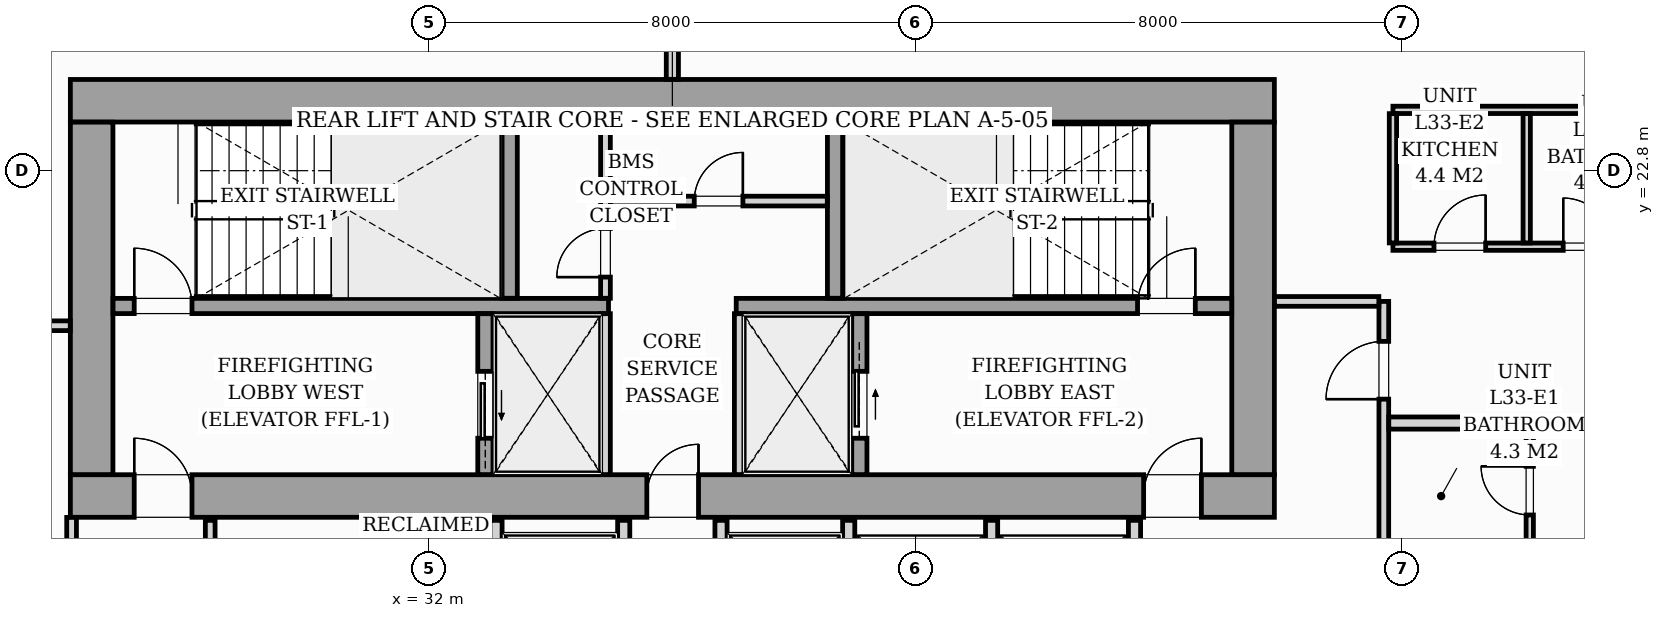
"""IFC4 building model, lengths in metres.
Left out: names, types, materials, properties, quantities, classifications, styles, units other than length and angle.
Written with IfcOpenShell. Run it as: python <this file> out.ifc"""

import sys

from ifc_helpers import new_model, si_unit, direction, frame, frame_2d, origin, origin_2d, place, context, subcontext, project, spatial, rectangle, i_section, extrude, source, transform, mapped, element, fill, save


model = new_model("IFC4")
c1 = context("Model", 3, precision=1e-05, world=origin(), true_north=direction((0.0, 1.0)))
c2 = subcontext(c1, "Body", "Model", "MODEL_VIEW")
j1 = project(units=[si_unit("LENGTHUNIT", "METRE"), si_unit("PLANEANGLEUNIT", "RADIAN")], contexts=[c1])
p1 = place(None, origin())
s1 = spatial("IfcSite", under=j1, at=p1, CompositionType="ELEMENT")
p2 = place(p1, origin())
s2 = spatial("IfcBuilding", under=s1, at=p2, CompositionType="ELEMENT")
p3 = place(p2, frame((0.0, 0.0, 116.2)))
s3 = spatial("IfcBuildingStorey", under=s2, at=p3, CompositionType="ELEMENT", Elevation=116.2)
m1 = source(origin(), c2, "Body", "SweptSolid", [
    extrude(i_section(OverallWidth=0.427, OverallDepth=0.483, WebThickness=0.051, FlangeThickness=0.082, FilletRadius=0.018, at=origin_2d()), origin(), (0.0, 0.0, 1.0), 3.196),
])
for number, where, z_axis, x_axis in (
    (1, (26.4, 17.4, 0.002), (0.0, 0.0, 1.0), (1.0, 0.0, 0.0)),
    (2, (33.12, 17.4, 0.002), (0.0, 0.0, 1.0), (1.0, 0.0, 0.0)),
    (3, (38.88, 17.4, 0.002), (0.0, 0.0, 1.0), (1.0, 0.0, 0.0)),
    (4, (45.6, 17.4, 0.002), (0.0, 0.0, 1.0), (1.0, 0.0, 0.0)),
    (5, (26.4, 24.0, 0.002), (0.0, 0.0, 1.0), (1.0, 0.0, 0.0)),
    (6, (33.12, 24.0, 0.002), (0.0, 0.0, 1.0), (1.0, 0.0, 0.0)),
    (7, (38.88, 24.0, 0.002), (0.0, 0.0, 1.0), (1.0, 0.0, 0.0)),
    (8, (45.6, 24.0, 0.002), (0.0, 0.0, 1.0), (1.0, 0.0, 0.0)),
):
    element("IfcColumn", number, at=place(p3, frame(where, z_axis=z_axis, x_axis=x_axis)), inside=s3, PredefinedType="PILASTER", context=c2, shape_type="MappedRepresentation", body=[
        mapped(m1, transform((0.0, 0.0, 0.0), scale=1.0)),
    ])
p4 = place(p3, frame((11.08, 23.508, 0.0), z_axis=(0.0, 0.0, 1.0), x_axis=(0.995396638587, 0.095841180552, 0.0)))
e9 = element("IfcWall", 9, at=p4, inside=s3, PredefinedType="STANDARD", context=c2, shape_type="SweptSolid", body=[
    extrude(rectangle(XDim=19.11, YDim=0.26, at=frame_2d((9.555, 0.0))), origin(), (0.0, 0.0, 1.0), 2.9),
])
p5 = place(p4, frame((10.754, 0.0, 0.0)))
e10 = element("IfcOpeningElement", 10, at=p5, cuts=e9, PredefinedType="OPENING", context=c2, shape_type="SweptSolid", body=[
    extrude(rectangle(XDim=1.8, YDim=2.06, at=frame_2d((0.9, 1.03))), frame((0.0, 0.14, 0.0), z_axis=(0.0, -1.0, 0.0), x_axis=(1.0, 0.0, 0.0)), (0.0, 0.0, 1.0), 0.28),
])
p6 = place(p4, frame((2.05, 0.0, 0.65)))
e11 = element("IfcOpeningElement", 11, at=p6, cuts=e9, PredefinedType="OPENING", context=c2, shape_type="SweptSolid", body=[
    extrude(rectangle(XDim=1.6, YDim=1.5, at=frame_2d((0.8, 0.75))), frame((0.0, 0.14, 0.0), z_axis=(0.0, -1.0, 0.0), x_axis=(1.0, 0.0, 0.0)), (0.0, 0.0, 1.0), 0.28),
])
p7 = place(p3, frame((26.1, 17.45, 0.0), z_axis=(0.0, 0.0, 1.0), x_axis=(1.0, 0.0, 0.0)))
e12 = element("IfcWall", 12, at=p7, inside=s3, PredefinedType="SHEAR", context=c2, shape_type="SweptSolid", body=[
    extrude(rectangle(XDim=19.8, YDim=0.7, at=frame_2d((9.9, 0.0))), origin(), (0.0, 0.0, 1.0), 3.2),
])
p8 = place(p7, frame((1.05, 0.0, 0.0)))
e13 = element("IfcOpeningElement", 13, at=p8, cuts=e12, PredefinedType="OPENING", context=c2, shape_type="SweptSolid", body=[
    extrude(rectangle(XDim=0.95, YDim=2.06, at=frame_2d((0.475, 1.03))), frame((0.0, 0.36, 0.0), z_axis=(0.0, -1.0, 0.0), x_axis=(1.0, 0.0, 0.0)), (0.0, 0.0, 1.0), 0.72),
])
p9 = place(p7, frame((9.48, 0.0, 0.0)))
e14 = element("IfcOpeningElement", 14, at=p9, cuts=e12, PredefinedType="OPENING", context=c2, shape_type="SweptSolid", body=[
    extrude(rectangle(XDim=0.85, YDim=2.0, at=frame_2d((0.425, 1.0))), frame((0.0, 0.36, 0.0), z_axis=(0.0, -1.0, 0.0), x_axis=(1.0, 0.0, 0.0)), (0.0, 0.0, 1.0), 0.72),
])
p10 = place(p7, frame((17.65, 0.0, 0.0)))
e15 = element("IfcOpeningElement", 15, at=p10, cuts=e12, PredefinedType="OPENING", context=c2, shape_type="SweptSolid", body=[
    extrude(rectangle(XDim=0.95, YDim=2.06, at=frame_2d((0.475, 1.03))), frame((0.0, 0.36, 0.0), z_axis=(0.0, -1.0, 0.0), x_axis=(1.0, 0.0, 0.0)), (0.0, 0.0, 1.0), 0.72),
])
p11 = place(p3, frame((26.1, 23.95, 0.0), z_axis=(0.0, 0.0, 1.0), x_axis=(1.0, 0.0, 0.0)))
e16 = element("IfcWall", 16, at=p11, inside=s3, PredefinedType="SHEAR", context=c2, shape_type="SweptSolid", body=[
    extrude(rectangle(XDim=19.8, YDim=0.7, at=frame_2d((9.9, 0.0))), origin(), (0.0, 0.0, 1.0), 3.2),
])
for number, where, z_axis, x_axis in (
    (17, (26.45, 17.802, 0.0), (0.0, 0.0, 1.0), (0.0, 1.0, 0.0)),
    (18, (45.55, 17.802, 0.0), (0.0, 0.0, 1.0), (0.0, 1.0, 0.0)),
):
    element("IfcWall", number, at=place(p3, frame(where, z_axis=z_axis, x_axis=x_axis)), inside=s3, PredefinedType="SHEAR", context=c2, shape_type="SweptSolid", body=[
        extrude(rectangle(XDim=5.796, YDim=0.7, at=frame_2d((2.898, 0.0))), origin(), (0.0, 0.0, 1.0), 3.2),
    ])
p12 = place(p3, frame((26.802, 20.575, 0.0), z_axis=(0.0, 0.0, 1.0), x_axis=(1.0, 0.0, 0.0)))
e19 = element("IfcWall", 19, at=p12, inside=s3, PredefinedType="SOLIDWALL", context=c2, shape_type="SweptSolid", body=[
    extrude(rectangle(XDim=8.148, YDim=0.25, at=frame_2d((4.074, 0.0))), origin(), (0.0, 0.0, 1.0), 3.2),
])
p13 = place(p12, frame((0.348, 0.0, 0.0)))
e20 = element("IfcOpeningElement", 20, at=p13, cuts=e19, PredefinedType="OPENING", context=c2, shape_type="SweptSolid", body=[
    extrude(rectangle(XDim=0.95, YDim=2.06, at=frame_2d((0.475, 1.03))), frame((0.0, 0.135, 0.0), z_axis=(0.0, -1.0, 0.0), x_axis=(1.0, 0.0, 0.0)), (0.0, 0.0, 1.0), 0.27),
])
p14 = place(p3, frame((37.05, 20.575, 0.0), z_axis=(0.0, 0.0, 1.0), x_axis=(1.0, 0.0, 0.0)))
e21 = element("IfcWall", 21, at=p14, inside=s3, PredefinedType="SOLIDWALL", context=c2, shape_type="SweptSolid", body=[
    extrude(rectangle(XDim=8.148, YDim=0.25, at=frame_2d((4.074, 0.0))), origin(), (0.0, 0.0, 1.0), 3.2),
])
p15 = place(p14, frame((6.6, 0.0, 0.0)))
e22 = element("IfcOpeningElement", 22, at=p15, cuts=e21, PredefinedType="OPENING", context=c2, shape_type="SweptSolid", body=[
    extrude(rectangle(XDim=0.95, YDim=2.06, at=frame_2d((0.475, 1.03))), frame((0.0, 0.135, 0.0), z_axis=(0.0, -1.0, 0.0), x_axis=(1.0, 0.0, 0.0)), (0.0, 0.0, 1.0), 0.27),
])
for number, where, z_axis, x_axis in (
    (23, (33.325, 20.702, 0.0), (0.0, 0.0, 1.0), (0.0, 1.0, 0.0)),
    (24, (38.675, 20.702, 0.0), (0.0, 0.0, 1.0), (0.0, 1.0, 0.0)),
):
    element("IfcWall", number, at=place(p3, frame(where, z_axis=z_axis, x_axis=x_axis)), inside=s3, PredefinedType="SOLIDWALL", context=c2, shape_type="SweptSolid", body=[
        extrude(rectangle(XDim=2.896, YDim=0.25, at=frame_2d((1.448, 0.0))), origin(), (0.0, 0.0, 1.0), 3.2),
    ])
p16 = place(p3, frame((32.925, 17.802, 0.0), z_axis=(0.0, 0.0, 1.0), x_axis=(0.0, 1.0, 0.0)))
e25 = element("IfcWall", 25, at=p16, inside=s3, PredefinedType="SOLIDWALL", context=c2, shape_type="SweptSolid", body=[
    extrude(rectangle(XDim=2.646, YDim=0.25, at=frame_2d((1.323, 0.0))), origin(), (0.0, 0.0, 1.0), 3.2),
])
p17 = place(p16, frame((0.598, 0.0, 0.0)))
e26 = element("IfcOpeningElement", 26, at=p17, cuts=e25, PredefinedType="OPENING", context=c2, shape_type="SweptSolid", body=[
    extrude(rectangle(XDim=1.1, YDim=2.08, at=frame_2d((0.55, 1.04))), frame((0.0, 0.135, 0.0), z_axis=(0.0, -1.0, 0.0), x_axis=(1.0, 0.0, 0.0)), (0.0, 0.0, 1.0), 0.27),
])
for number, where, z_axis, x_axis in (
    (27, (34.9, 17.802, 0.0), (0.0, 0.0, 1.0), (0.0, 1.0, 0.0)),
    (28, (37.1, 17.802, 0.0), (0.0, 0.0, 1.0), (0.0, 1.0, 0.0)),
):
    element("IfcWall", number, at=place(p3, frame(where, z_axis=z_axis, x_axis=x_axis)), inside=s3, PredefinedType="PARTITIONING", context=c2, shape_type="SweptSolid", body=[
        extrude(rectangle(XDim=2.646, YDim=0.16, at=frame_2d((1.323, 0.0))), origin(), (0.0, 0.0, 1.0), 2.9),
    ])
p18 = place(p3, frame((39.075, 17.802, 0.0), z_axis=(0.0, 0.0, 1.0), x_axis=(0.0, 1.0, 0.0)))
e29 = element("IfcWall", 29, at=p18, inside=s3, PredefinedType="SOLIDWALL", context=c2, shape_type="SweptSolid", body=[
    extrude(rectangle(XDim=2.646, YDim=0.25, at=frame_2d((1.323, 0.0))), origin(), (0.0, 0.0, 1.0), 3.2),
])
p19 = place(p18, frame((0.598, 0.0, 0.0)))
e30 = element("IfcOpeningElement", 30, at=p19, cuts=e29, PredefinedType="OPENING", context=c2, shape_type="SweptSolid", body=[
    extrude(rectangle(XDim=1.1, YDim=2.08, at=frame_2d((0.55, 1.04))), frame((0.0, 0.135, 0.0), z_axis=(0.0, -1.0, 0.0), x_axis=(1.0, 0.0, 0.0)), (0.0, 0.0, 1.0), 0.27),
])
p20 = place(p3, frame((34.9, 20.702, 0.0), z_axis=(0.0, 0.0, 1.0), x_axis=(0.0, 1.0, 0.0)))
e31 = element("IfcWall", 31, at=p20, inside=s3, PredefinedType="PARTITIONING", context=c2, shape_type="SweptSolid", body=[
    extrude(rectangle(XDim=2.896, YDim=0.16, at=frame_2d((1.448, 0.0))), origin(), (0.0, 0.0, 1.0), 2.9),
])
p21 = place(p20, frame((0.348, 0.0, 0.0)))
e32 = element("IfcOpeningElement", 32, at=p21, cuts=e31, PredefinedType="OPENING", context=c2, shape_type="SweptSolid", body=[
    extrude(rectangle(XDim=0.8, YDim=2.05, at=frame_2d((0.4, 1.025))), frame((0.0, 0.09, 0.0), z_axis=(0.0, -1.0, 0.0), x_axis=(1.0, 0.0, 0.0)), (0.0, 0.0, 1.0), 0.18),
])
p22 = place(p3, frame((34.982, 22.3, 0.0), z_axis=(0.0, 0.0, 1.0), x_axis=(1.0, 0.0, 0.0)))
e33 = element("IfcWall", 33, at=p22, inside=s3, PredefinedType="PARTITIONING", context=c2, shape_type="SweptSolid", body=[
    extrude(rectangle(XDim=3.566, YDim=0.16, at=frame_2d((1.783, 0.0))), origin(), (0.0, 0.0, 1.0), 2.9),
])
p23 = place(p22, frame((1.378, 0.0, 0.0)))
e34 = element("IfcOpeningElement", 34, at=p23, cuts=e33, PredefinedType="OPENING", context=c2, shape_type="SweptSolid", body=[
    extrude(rectangle(XDim=0.8, YDim=2.05, at=frame_2d((0.4, 1.025))), frame((0.0, 0.09, 0.0), z_axis=(0.0, -1.0, 0.0), x_axis=(1.0, 0.0, 0.0)), (0.0, 0.0, 1.0), 0.18),
])
p24 = place(p3, frame((28.4, 14.75, 0.0), z_axis=(0.0, 0.0, 1.0), x_axis=(0.0, 1.0, 0.0)))
e35 = element("IfcWall", 35, at=p24, inside=s3, PredefinedType="PARTITIONING", context=c2, shape_type="SweptSolid", body=[
    extrude(rectangle(XDim=2.3, YDim=0.16, at=frame_2d((1.15, 0.0))), origin(), (0.0, 0.0, 1.0), 2.9),
])
for number, where, z_axis, x_axis in (
    (36, (33.1, 14.75, 0.0), (0.0, 0.0, 1.0), (0.0, 1.0, 0.0)),
    (37, (35.2, 14.75, 0.0), (0.0, 0.0, 1.0), (0.0, 1.0, 0.0)),
    (38, (36.8, 14.75, 0.0), (0.0, 0.0, 1.0), (0.0, 1.0, 0.0)),
    (39, (38.9, 14.75, 0.0), (0.0, 0.0, 1.0), (0.0, 1.0, 0.0)),
    (40, (41.25, 14.75, 0.0), (0.0, 0.0, 1.0), (0.0, 1.0, 0.0)),
    (41, (43.6, 14.75, 0.0), (0.0, 0.0, 1.0), (0.0, 1.0, 0.0)),
):
    element("IfcWall", number, at=place(p3, frame(where, z_axis=z_axis, x_axis=x_axis)), inside=s3, PredefinedType="PARTITIONING", context=c2, shape_type="SweptSolid", body=[
        extrude(rectangle(XDim=2.3, YDim=0.2, at=frame_2d((1.15, 0.0))), origin(), (0.0, 0.0, 1.0), 2.9),
    ])
p25 = place(p3, frame((47.7, 12.732, 0.0), z_axis=(0.0, 0.0, 1.0), x_axis=(0.0, 1.0, 0.0)))
e42 = element("IfcWall", 42, at=p25, inside=s3, PredefinedType="PARTITIONING", context=c2, shape_type="SweptSolid", body=[
    extrude(rectangle(XDim=7.918, YDim=0.16, at=frame_2d((3.959, 0.0))), origin(), (0.0, 0.0, 1.0), 2.9),
])
p26 = place(p25, frame((0.493, 0.0, 0.0)))
e43 = element("IfcOpeningElement", 43, at=p26, cuts=e42, PredefinedType="OPENING", context=c2, shape_type="SweptSolid", body=[
    extrude(rectangle(XDim=0.85, YDim=2.0, at=frame_2d((0.425, 1.0))), frame((0.0, 0.09, 0.0), z_axis=(0.0, -1.0, 0.0), x_axis=(1.0, 0.0, 0.0)), (0.0, 0.0, 1.0), 0.18),
])
p27 = place(p25, frame((6.311, 0.0, 0.0)))
e44 = element("IfcOpeningElement", 44, at=p27, cuts=e42, PredefinedType="OPENING", context=c2, shape_type="SweptSolid", body=[
    extrude(rectangle(XDim=0.95, YDim=2.06, at=frame_2d((0.475, 1.03))), frame((0.0, 0.09, 0.0), z_axis=(0.0, -1.0, 0.0), x_axis=(1.0, 0.0, 0.0)), (0.0, 0.0, 1.0), 0.18),
])
p28 = place(p3, frame((36.0, 24.302, 0.0), z_axis=(0.0, 0.0, 1.0), x_axis=(0.0, 1.0, 0.0)))
e45 = element("IfcWall", 45, at=p28, inside=s3, PredefinedType="PARTITIONING", context=c2, shape_type="SweptSolid", body=[
    extrude(rectangle(XDim=1.656, YDim=0.2, at=frame_2d((0.828, 0.0))), origin(), (0.0, 0.0, 1.0), 2.9),
])
p29 = place(p3, frame((45.902, 20.65, 0.0), z_axis=(0.0, 0.0, 1.0), x_axis=(1.0, 0.0, 0.0)))
e46 = element("IfcWall", 46, at=p29, inside=s3, PredefinedType="PARTITIONING", context=c2, shape_type="SweptSolid", body=[
    extrude(rectangle(XDim=1.716, YDim=0.16, at=frame_2d((0.858, 0.0))), origin(), (0.0, 0.0, 1.0), 2.9),
])
p30 = place(p3, frame((47.782, 18.65, 0.0), z_axis=(0.0, 0.0, 1.0), x_axis=(1.0, 0.0, 0.0)))
e47 = element("IfcWall", 47, at=p30, inside=s3, PredefinedType="PARTITIONING", context=c2, shape_type="SweptSolid", body=[
    extrude(rectangle(XDim=21.049, YDim=0.2, at=frame_2d((10.525, 0.0))), origin(), (0.0, 0.0, 1.0), 2.023),
])
p31 = place(p3, frame((50.1, 14.5, 0.0), z_axis=(0.0, 0.0, 1.0), x_axis=(0.0, 1.0, 0.0)))
e48 = element("IfcWall", 48, at=p31, inside=s3, PredefinedType="PARTITIONING", context=c2, shape_type="SweptSolid", body=[
    extrude(rectangle(XDim=4.048, YDim=0.12, at=frame_2d((2.024, 0.0))), origin(), (0.0, 0.0, 1.0), 2.9),
])
p32 = place(p31, frame((0.587, 0.0, 0.0)))
e49 = element("IfcOpeningElement", 49, at=p32, cuts=e48, PredefinedType="OPENING", context=c2, shape_type="SweptSolid", body=[
    extrude(rectangle(XDim=0.85, YDim=2.05, at=frame_2d((0.425, 1.025))), frame((0.0, 0.07, 0.0), z_axis=(0.0, -1.0, 0.0), x_axis=(1.0, 0.0, 0.0)), (0.0, 0.0, 1.0), 0.14),
])
p33 = place(p31, frame((2.638, 0.0, 0.0)))
e50 = element("IfcOpeningElement", 50, at=p33, cuts=e48, PredefinedType="OPENING", context=c2, shape_type="SweptSolid", body=[
    extrude(rectangle(XDim=0.8, YDim=2.0, at=frame_2d((0.4, 1.0))), frame((0.0, 0.07, 0.0), z_axis=(0.0, -1.0, 0.0), x_axis=(1.0, 0.0, 0.0)), (0.0, 0.0, 1.0), 0.14),
])
p34 = place(p3, frame((47.85, 21.55, 0.0), z_axis=(0.0, 0.0, 1.0), x_axis=(1.0, 0.0, 0.0)))
e51 = element("IfcWall", 51, at=p34, inside=s3, PredefinedType="PARTITIONING", context=c2, shape_type="SweptSolid", body=[
    extrude(rectangle(XDim=4.2, YDim=0.12, at=frame_2d((2.1, 0.0))), origin(), (0.0, 0.0, 1.0), 2.9),
])
p35 = place(p34, frame((0.675, 0.0, 0.0)))
e52 = element("IfcOpeningElement", 52, at=p35, cuts=e51, PredefinedType="OPENING", context=c2, shape_type="SweptSolid", body=[
    extrude(rectangle(XDim=0.85, YDim=2.05, at=frame_2d((0.425, 1.025))), frame((0.0, 0.07, 0.0), z_axis=(0.0, -1.0, 0.0), x_axis=(1.0, 0.0, 0.0)), (0.0, 0.0, 1.0), 0.14),
])
p36 = place(p34, frame((2.8, 0.0, 0.0)))
e53 = element("IfcOpeningElement", 53, at=p36, cuts=e51, PredefinedType="OPENING", context=c2, shape_type="SweptSolid", body=[
    extrude(rectangle(XDim=0.8, YDim=2.02, at=frame_2d((0.4, 1.01))), frame((0.0, 0.07, 0.0), z_axis=(0.0, -1.0, 0.0), x_axis=(1.0, 0.0, 0.0)), (0.0, 0.0, 1.0), 0.14),
])
p37 = place(p3, frame((47.85, 23.8, 0.0), z_axis=(0.0, 0.0, 1.0), x_axis=(1.0, 0.0, 0.0)))
e54 = element("IfcWall", 54, at=p37, inside=s3, PredefinedType="PARTITIONING", context=c2, shape_type="SweptSolid", body=[
    extrude(rectangle(XDim=4.2, YDim=0.12, at=frame_2d((2.1, 0.0))), origin(), (0.0, 0.0, 1.0), 2.9),
])
for number, where, z_axis, x_axis in (
    (55, (47.85, 21.612, 0.0), (0.0, 0.0, 1.0), (0.0, 1.0, 0.0)),
    (56, (50.05, 21.612, 0.0), (0.0, 0.0, 1.0), (0.0, 1.0, 0.0)),
):
    element("IfcWall", number, at=place(p3, frame(where, z_axis=z_axis, x_axis=x_axis)), inside=s3, PredefinedType="PARTITIONING", context=c2, shape_type="SweptSolid", body=[
        extrude(rectangle(XDim=2.126, YDim=0.12, at=frame_2d((1.063, 0.0))), origin(), (0.0, 0.0, 1.0), 2.9),
    ])
p38 = place(p3, frame((23.632, 20.25, 0.0), z_axis=(0.0, 0.0, 1.0), x_axis=(1.0, 0.0, 0.0)))
e57 = element("IfcWall", 57, at=p38, inside=s3, PredefinedType="PARTITIONING", context=c2, shape_type="SweptSolid", body=[
    extrude(rectangle(XDim=2.466, YDim=0.16, at=frame_2d((1.233, 0.0))), origin(), (0.0, 0.0, 1.0), 2.9),
])
p39 = place(p3, frame((26.12, 14.66, 0.0), z_axis=(0.0, 0.0, 1.0), x_axis=(0.0, 1.0, 0.0)))
e58 = element("IfcWall", 58, at=p39, inside=s3, PredefinedType="PARTITIONING", context=c2, shape_type="SweptSolid", body=[
    extrude(rectangle(XDim=2.438, YDim=0.16, at=frame_2d((1.219, 0.0))), origin(), (0.0, 0.0, 1.0), 2.9),
])
m2 = source(origin(), c2, "Body", "SweptSolid", [
    extrude(rectangle(XDim=0.95, YDim=2.06, at=frame_2d((0.475, 1.03))), frame((0.0, 0.025, 0.0), z_axis=(0.0, -1.0, 0.0), x_axis=(1.0, 0.0, 0.0)), (0.0, 0.0, 1.0), 0.05),
])
p40 = place(p8, origin())
e59 = element("IfcDoor", 59, at=p40, inside=s3, OperationType="SINGLE_SWING_LEFT", PredefinedType="DOOR", context=c2, shape_type="MappedRepresentation", body=[
    mapped(m2, transform((0.0, 0.0, 0.0), scale=1.0)),
])
fill(e13, e59)
m3 = source(origin(), c2, "Body", "SweptSolid", [
    extrude(rectangle(XDim=0.85, YDim=2.0, at=frame_2d((0.425, 1.0))), frame((0.0, 0.025, 0.0), z_axis=(0.0, -1.0, 0.0), x_axis=(1.0, 0.0, 0.0)), (0.0, 0.0, 1.0), 0.05),
])
p41 = place(p9, origin())
e60 = element("IfcDoor", 60, at=p41, inside=s3, OperationType="SINGLE_SWING_RIGHT", PredefinedType="DOOR", context=c2, shape_type="MappedRepresentation", body=[
    mapped(m3, transform((0.0, 0.0, 0.0), scale=1.0)),
])
fill(e14, e60)
p42 = place(p10, origin())
e61 = element("IfcDoor", 61, at=p42, inside=s3, OperationType="SINGLE_SWING_RIGHT", PredefinedType="DOOR", context=c2, shape_type="MappedRepresentation", body=[
    mapped(m2, transform((0.0, 0.0, 0.0), scale=1.0)),
])
fill(e15, e61)
p43 = place(p13, origin())
e62 = element("IfcDoor", 62, at=p43, inside=s3, OperationType="SINGLE_SWING_LEFT", PredefinedType="DOOR", context=c2, shape_type="MappedRepresentation", body=[
    mapped(m2, transform((0.0, 0.0, 0.0), scale=1.0)),
])
fill(e20, e62)
p44 = place(p15, origin())
e63 = element("IfcDoor", 63, at=p44, inside=s3, OperationType="SINGLE_SWING_RIGHT", PredefinedType="DOOR", context=c2, shape_type="MappedRepresentation", body=[
    mapped(m2, transform((0.0, 0.0, 0.0), scale=1.0)),
])
fill(e22, e63)
m4 = source(origin(), c2, "Body", "SweptSolid", [
    extrude(rectangle(XDim=1.1, YDim=2.08, at=frame_2d((0.55, 1.04))), frame((0.0, 0.025, 0.0), z_axis=(0.0, -1.0, 0.0), x_axis=(1.0, 0.0, 0.0)), (0.0, 0.0, 1.0), 0.05),
])
p45 = place(p17, origin())
e64 = element("IfcDoor", 64, at=p45, inside=s3, OperationType="SLIDING_TO_LEFT", PredefinedType="DOOR", context=c2, shape_type="MappedRepresentation", body=[
    mapped(m4, transform((0.0, 0.0, 0.0), scale=1.0)),
])
fill(e26, e64)
p46 = place(p19, origin())
e65 = element("IfcDoor", 65, at=p46, inside=s3, OperationType="SLIDING_TO_RIGHT", PredefinedType="DOOR", context=c2, shape_type="MappedRepresentation", body=[
    mapped(m4, transform((0.0, 0.0, 0.0), scale=1.0)),
])
fill(e30, e65)
m5 = source(origin(), c2, "Body", "SweptSolid", [
    extrude(rectangle(XDim=0.8, YDim=2.05, at=frame_2d((0.4, 1.025))), frame((0.0, 0.025, 0.0), z_axis=(0.0, -1.0, 0.0), x_axis=(1.0, 0.0, 0.0)), (0.0, 0.0, 1.0), 0.05),
])
p47 = place(p21, origin())
e66 = element("IfcDoor", 66, at=p47, inside=s3, OperationType="SINGLE_SWING_LEFT", PredefinedType="DOOR", context=c2, shape_type="MappedRepresentation", body=[
    mapped(m5, transform((0.0, 0.0, 0.0), scale=1.0)),
])
fill(e32, e66)
p48 = place(p23, origin())
e67 = element("IfcDoor", 67, at=p48, inside=s3, OperationType="SINGLE_SWING_RIGHT", PredefinedType="DOOR", context=c2, shape_type="MappedRepresentation", body=[
    mapped(m5, transform((0.0, 0.0, 0.0), scale=1.0)),
])
fill(e34, e67)
m6 = source(origin(), c2, "Body", "SweptSolid", [
    extrude(rectangle(XDim=0.8, YDim=2.0, at=frame_2d((0.4, 1.0))), frame((0.0, 0.025, 0.0), z_axis=(0.0, -1.0, 0.0), x_axis=(1.0, 0.0, 0.0)), (0.0, 0.0, 1.0), 0.05),
])
p49 = place(p33, origin())
e68 = element("IfcDoor", 68, at=p49, inside=s3, OperationType="SINGLE_SWING_RIGHT", PredefinedType="DOOR", context=c2, shape_type="MappedRepresentation", body=[
    mapped(m6, transform((0.0, 0.0, 0.0), scale=1.0)),
])
fill(e50, e68)
m7 = source(origin(), c2, "Body", "SweptSolid", [
    extrude(rectangle(XDim=0.95, YDim=2.06, at=frame_2d((0.475, 1.03))), frame((0.0, 0.025, 0.0), z_axis=(0.0, -1.0, 0.0), x_axis=(1.0, 0.0, 0.0)), (0.0, 0.0, 1.0), 0.05),
])
p50 = place(p27, origin())
e69 = element("IfcDoor", 69, at=p50, inside=s3, OperationType="SINGLE_SWING_LEFT", PredefinedType="DOOR", context=c2, shape_type="MappedRepresentation", body=[
    mapped(m7, transform((0.0, 0.0, 0.0), scale=1.0)),
])
fill(e44, e69)
m8 = source(origin(), c2, "Body", "SweptSolid", [
    extrude(rectangle(XDim=0.85, YDim=2.05, at=frame_2d((0.425, 1.025))), frame((0.0, 0.025, 0.0), z_axis=(0.0, -1.0, 0.0), x_axis=(1.0, 0.0, 0.0)), (0.0, 0.0, 1.0), 0.05),
])
p51 = place(p35, origin())
e70 = element("IfcDoor", 70, at=p51, inside=s3, OperationType="SINGLE_SWING_RIGHT", PredefinedType="DOOR", context=c2, shape_type="MappedRepresentation", body=[
    mapped(m8, transform((0.0, 0.0, 0.0), scale=1.0)),
])
fill(e52, e70)
m9 = source(origin(), c2, "Body", "SweptSolid", [
    extrude(rectangle(XDim=0.8, YDim=2.02, at=frame_2d((0.4, 1.01))), frame((0.0, 0.025, 0.0), z_axis=(0.0, -1.0, 0.0), x_axis=(1.0, 0.0, 0.0)), (0.0, 0.0, 1.0), 0.05),
])
p52 = place(p36, origin())
e71 = element("IfcDoor", 71, at=p52, inside=s3, OperationType="SINGLE_SWING_LEFT", PredefinedType="DOOR", context=c2, shape_type="MappedRepresentation", body=[
    mapped(m9, transform((0.0, 0.0, 0.0), scale=1.0)),
])
fill(e53, e71)
save(model, sys.argv[1])
